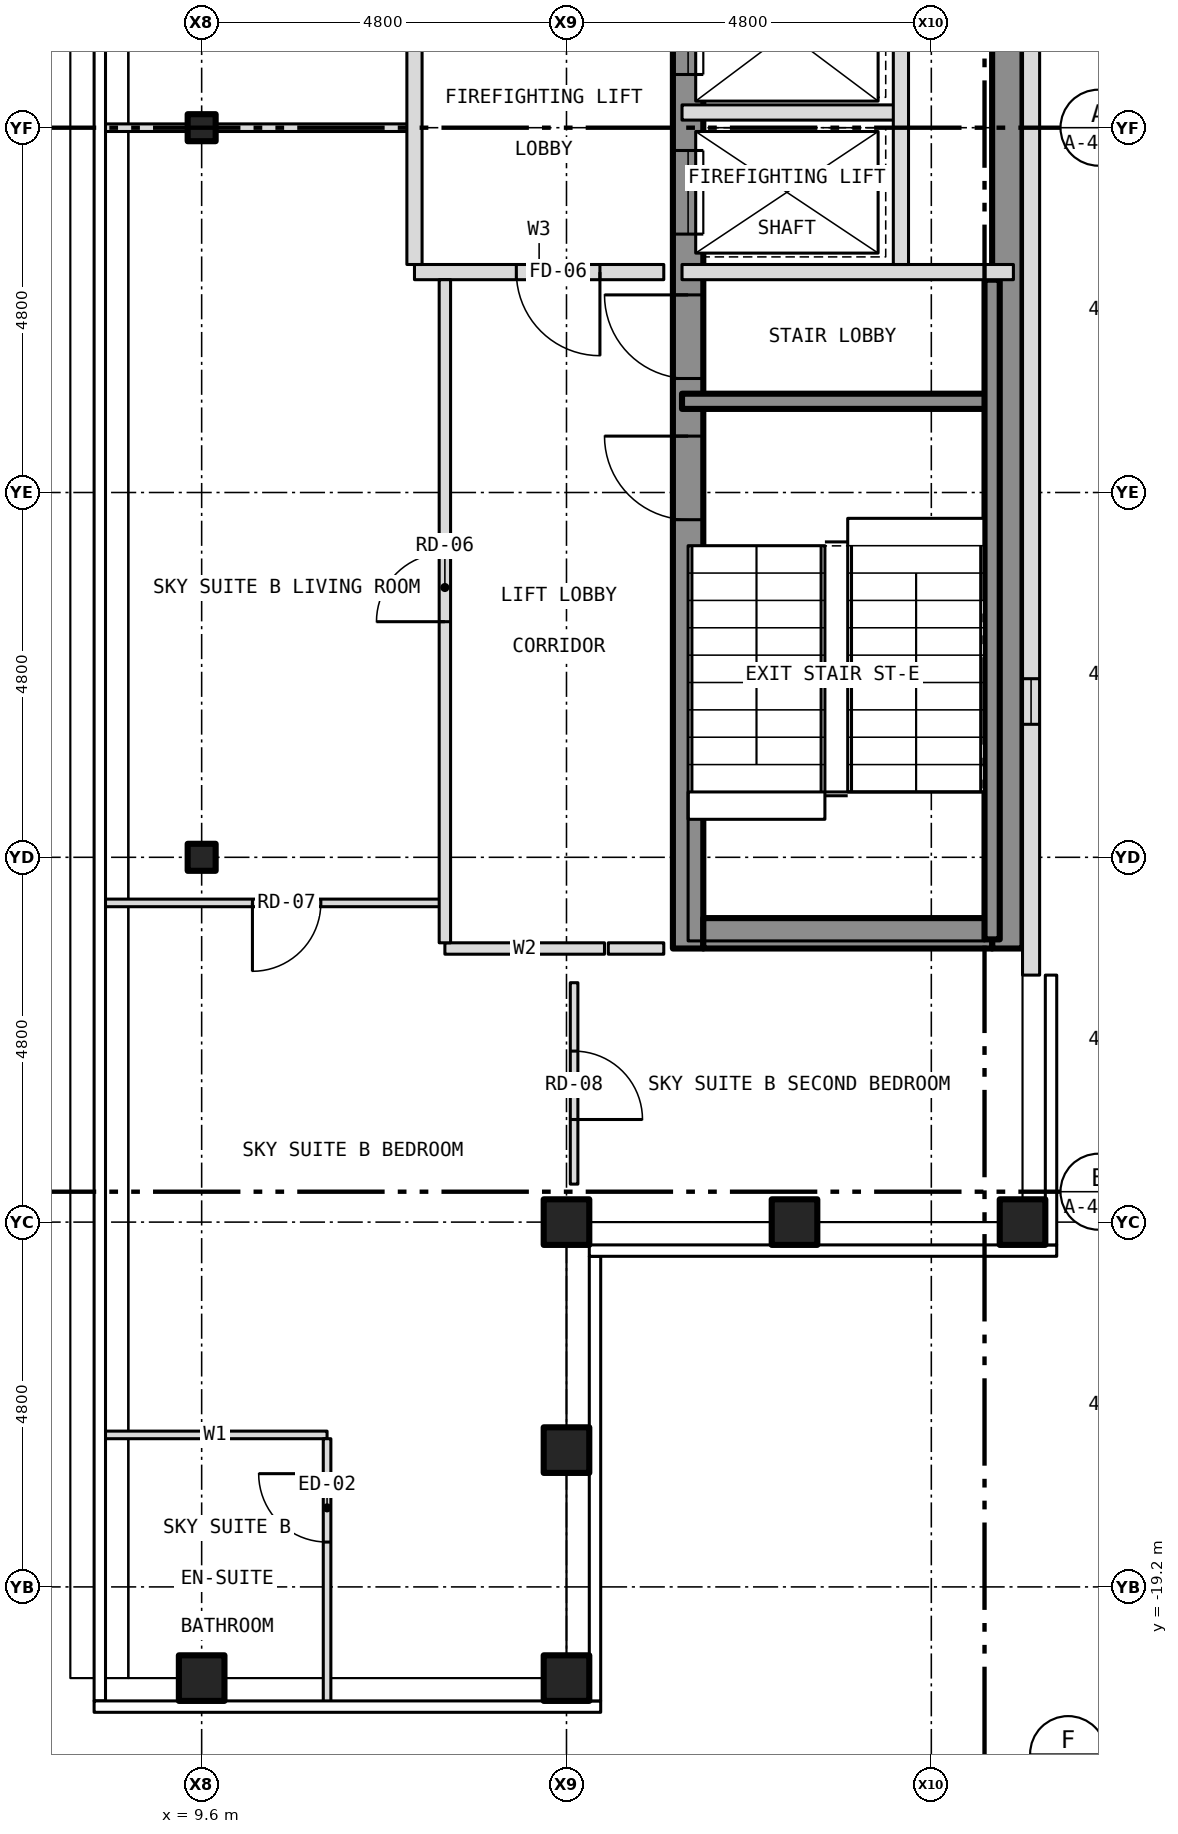
"""IFC4 building model, lengths in metres.
Left out: names, types, materials, properties, quantities, classifications, styles, units other than length and angle.
Written with IfcOpenShell. Run it as: python <this file> out.ifc"""

import sys

from ifc_helpers import new_model, si_unit, direction, frame, frame_2d, origin, origin_2d, place, context, subcontext, project, spatial, rectangle, hollow_rectangle, i_section, extrude, element, fill, save


model = new_model("IFC4")
c1 = context("Model", 3, precision=1e-05, world=origin(), true_north=direction((0.0, 1.0)))
c2 = subcontext(c1, "Body", "Model", "MODEL_VIEW")
j1 = project(units=[si_unit("LENGTHUNIT", "METRE"), si_unit("PLANEANGLEUNIT", "RADIAN")], contexts=[c1])
p1 = place(None, origin())
s1 = spatial("IfcSite", under=j1, at=p1, CompositionType="ELEMENT")
p2 = place(p1, origin())
s2 = spatial("IfcBuilding", under=s1, at=p2, CompositionType="ELEMENT")
p3 = place(p2, frame((0.0, 0.0, 272.5)))
s3 = spatial("IfcBuildingStorey", under=s2, at=p3, CompositionType="ELEMENT", Elevation=272.5)
for number, where, z_axis, x_axis in (
    (1, (9.6, -20.4, -0.15), (0.0, 0.0, 1.0), (1.0, 0.0, 0.0)),
    (2, (14.4, -20.4, -0.15), (0.0, 0.0, 1.0), (1.0, 0.0, 0.0)),
    (3, (20.4, -14.4, -0.15), (0.0, 0.0, 1.0), (1.0, 0.0, 0.0)),
    (4, (14.4, -14.4, -0.15), (0.0, 0.0, 1.0), (1.0, 0.0, 0.0)),
    (5, (14.4, -17.4, -0.15), (0.0, 0.0, 1.0), (1.0, 0.0, 0.0)),
    (6, (17.4, -14.4, -0.15), (0.0, 0.0, 1.0), (1.0, 0.0, 0.0)),
):
    element("IfcColumn", number, at=place(p3, frame(where, z_axis=z_axis, x_axis=x_axis)), inside=s3, PredefinedType="COLUMN", context=c2, shape_type="SweptSolid", body=[
        extrude(hollow_rectangle(XDim=0.6, YDim=0.6, WallThickness=0.03, at=origin_2d()), origin(), (0.0, 0.0, 1.0), 3.5),
    ])
for number, where, z_axis, x_axis in (
    (7, (9.6, -9.6, -0.15), (0.0, 0.0, 1.0), (1.0, 0.0, 0.0)),
    (8, (9.6, 0.0, -0.15), (0.0, 0.0, 1.0), (1.0, 0.0, 0.0)),
):
    element("IfcColumn", number, at=place(p3, frame(where, z_axis=z_axis, x_axis=x_axis)), inside=s3, PredefinedType="COLUMN", context=c2, shape_type="SweptSolid", body=[
        extrude(i_section(OverallWidth=0.368, OverallDepth=0.356, WebThickness=0.011, FlangeThickness=0.018, at=origin_2d()), origin(), (0.0, 0.0, 1.0), 3.5),
    ])
p4 = place(p3, frame((16.0, -10.8, 0.0), z_axis=(0.0, 0.0, 1.0), x_axis=(0.0, 1.0, 0.0)))
e9 = element("IfcWall", 9, at=p4, inside=s3, PredefinedType="SHEAR", context=c2, shape_type="SweptSolid", body=[
    extrude(rectangle(XDim=21.6, YDim=0.4, at=frame_2d((10.8, 0.0))), origin(), (0.0, 0.0, 1.0), 3.25),
])
p5 = place(p4, frame((9.4, 0.0, 0.0)))
e10 = element("IfcOpeningElement", 10, at=p5, cuts=e9, PredefinedType="OPENING", context=c2, shape_type="SweptSolid", body=[
    extrude(rectangle(XDim=1.1, YDim=2.1, at=frame_2d((0.55, 1.05))), frame((0.0, 0.212, 0.0), z_axis=(0.0, -1.0, 0.0), x_axis=(1.0, 0.0, 0.0)), (0.0, 0.0, 1.0), 0.424),
])
p6 = place(p4, frame((11.5, 0.0, 0.0)))
e11 = element("IfcOpeningElement", 11, at=p6, cuts=e9, PredefinedType="OPENING", context=c2, shape_type="SweptSolid", body=[
    extrude(rectangle(XDim=1.1, YDim=2.1, at=frame_2d((0.55, 1.05))), frame((0.0, 0.212, 0.0), z_axis=(0.0, -1.0, 0.0), x_axis=(1.0, 0.0, 0.0)), (0.0, 0.0, 1.0), 0.424),
])
p7 = place(p4, frame((13.6, 0.0, 0.0)))
e12 = element("IfcOpeningElement", 12, at=p7, cuts=e9, PredefinedType="OPENING", context=c2, shape_type="SweptSolid", body=[
    extrude(rectangle(XDim=1.1, YDim=2.1, at=frame_2d((0.55, 1.05))), frame((0.0, 0.212, 0.0), z_axis=(0.0, -1.0, 0.0), x_axis=(1.0, 0.0, 0.0)), (0.0, 0.0, 1.0), 0.424),
])
p8 = place(p4, frame((15.7, 0.0, 0.0)))
e13 = element("IfcOpeningElement", 13, at=p8, cuts=e9, PredefinedType="OPENING", context=c2, shape_type="SweptSolid", body=[
    extrude(rectangle(XDim=1.1, YDim=2.1, at=frame_2d((0.55, 1.05))), frame((0.0, 0.212, 0.0), z_axis=(0.0, -1.0, 0.0), x_axis=(1.0, 0.0, 0.0)), (0.0, 0.0, 1.0), 0.424),
])
p9 = place(p4, frame((17.8, 0.0, 0.0)))
e14 = element("IfcOpeningElement", 14, at=p9, cuts=e9, PredefinedType="OPENING", context=c2, shape_type="SweptSolid", body=[
    extrude(rectangle(XDim=1.1, YDim=2.1, at=frame_2d((0.55, 1.05))), frame((0.0, 0.212, 0.0), z_axis=(0.0, -1.0, 0.0), x_axis=(1.0, 0.0, 0.0)), (0.0, 0.0, 1.0), 0.424),
])
p10 = place(p4, frame((5.642, 0.0, 0.0)))
e15 = element("IfcOpeningElement", 15, at=p10, cuts=e9, PredefinedType="OPENING", context=c2, shape_type="SweptSolid", body=[
    extrude(rectangle(XDim=1.1, YDim=2.1, at=frame_2d((0.55, 1.05))), frame((0.0, 0.212, 0.0), z_axis=(0.0, -1.0, 0.0), x_axis=(1.0, 0.0, 0.0)), (0.0, 0.0, 1.0), 0.424),
])
p11 = place(p4, frame((7.5, 0.0, 0.0)))
e16 = element("IfcOpeningElement", 16, at=p11, cuts=e9, PredefinedType="OPENING", context=c2, shape_type="SweptSolid", body=[
    extrude(rectangle(XDim=1.1, YDim=2.1, at=frame_2d((0.55, 1.05))), frame((0.0, 0.212, 0.0), z_axis=(0.0, -1.0, 0.0), x_axis=(1.0, 0.0, 0.0)), (0.0, 0.0, 1.0), 0.424),
])
p12 = place(p4, frame((20.0, 0.0, 0.0)))
e17 = element("IfcOpeningElement", 17, at=p12, cuts=e9, PredefinedType="OPENING", context=c2, shape_type="SweptSolid", body=[
    extrude(rectangle(XDim=0.9, YDim=2.1, at=frame_2d((0.45, 1.05))), frame((0.0, 0.212, 0.0), z_axis=(0.0, -1.0, 0.0), x_axis=(1.0, 0.0, 0.0)), (0.0, 0.0, 1.0), 0.424),
])
p13 = place(p3, frame((20.2, -10.8, 0.0), z_axis=(0.0, 0.0, 1.0), x_axis=(0.0, 1.0, 0.0)))
e18 = element("IfcWall", 18, at=p13, inside=s3, PredefinedType="SHEAR", context=c2, shape_type="SweptSolid", body=[
    extrude(rectangle(XDim=21.6, YDim=0.4, at=frame_2d((10.8, 0.0))), origin(), (0.0, 0.0, 1.0), 3.25),
])
p14 = place(p3, frame((16.2, -10.6, 0.0), z_axis=(0.0, 0.0, 1.0), x_axis=(1.0, 0.0, 0.0)))
e19 = element("IfcWall", 19, at=p14, inside=s3, PredefinedType="SHEAR", context=c2, shape_type="SweptSolid", body=[
    extrude(rectangle(XDim=3.8, YDim=0.4, at=frame_2d((1.9, 0.0))), origin(), (0.0, 0.0, 1.0), 3.25),
])
p15 = place(p3, frame((20.512, -11.15, 0.0), z_axis=(0.0, 0.0, 1.0), x_axis=(0.0, 1.0, 0.0)))
e20 = element("IfcWall", 20, at=p15, inside=s3, PredefinedType="SOLIDWALL", context=c2, shape_type="SweptSolid", body=[
    extrude(rectangle(XDim=22.3, YDim=0.225, at=frame_2d((11.15, 0.0))), origin(), (0.0, 0.0, 1.0), 3.5),
])
p16 = place(p15, frame((3.3, 0.0, 1.0)))
e21 = element("IfcOpeningElement", 21, at=p16, cuts=e20, PredefinedType="OPENING", context=c2, shape_type="SweptSolid", body=[
    extrude(rectangle(XDim=0.6, YDim=1.5, at=frame_2d((0.3, 0.75))), frame((0.0, 0.125, 0.0), z_axis=(0.0, -1.0, 0.0), x_axis=(1.0, 0.0, 0.0)), (0.0, 0.0, 1.0), 0.249),
])
p17 = place(p3, frame((8.305, -17.2, 0.0), z_axis=(0.0, 0.0, 1.0), x_axis=(1.0, 0.0, 0.0)))
e22 = element("IfcWall", 22, at=p17, inside=s3, PredefinedType="PARTITIONING", context=c2, shape_type="SweptSolid", body=[
    extrude(rectangle(XDim=2.945, YDim=0.1, at=frame_2d((1.473, 0.0))), origin(), (0.0, 0.0, 1.0), 3.35),
])
p18 = place(p3, frame((12.8, -10.8, 0.0), z_axis=(0.0, 0.0, 1.0), x_axis=(1.0, 0.0, 0.0)))
e23 = element("IfcWall", 23, at=p18, inside=s3, PredefinedType="PARTITIONING", context=c2, shape_type="SweptSolid", body=[
    extrude(rectangle(XDim=2.1, YDim=0.15, at=frame_2d((1.05, 0.0))), origin(), (0.0, 0.0, 1.0), 3.35),
])
p19 = place(p3, frame((14.95, -10.8, 0.0), z_axis=(0.0, 0.0, 1.0), x_axis=(1.0, 0.0, 0.0)))
e24 = element("IfcWall", 24, at=p19, inside=s3, PredefinedType="PARTITIONING", context=c2, shape_type="SweptSolid", body=[
    extrude(rectangle(XDim=0.73, YDim=0.15, at=frame_2d((0.365, 0.0))), origin(), (0.0, 0.0, 1.0), 3.35),
])
p20 = place(p3, frame((8.305, -10.2, 0.0), z_axis=(0.0, 0.0, 1.0), x_axis=(1.0, 0.0, 0.0)))
e25 = element("IfcWall", 25, at=p20, inside=s3, PredefinedType="PARTITIONING", context=c2, shape_type="SweptSolid", body=[
    extrude(rectangle(XDim=4.495, YDim=0.1, at=frame_2d((2.248, 0.0))), origin(), (0.0, 0.0, 1.0), 3.35),
])
p21 = place(p20, frame((1.963, 0.0, 0.0)))
e26 = element("IfcOpeningElement", 26, at=p21, cuts=e25, PredefinedType="OPENING", context=c2, shape_type="SweptSolid", body=[
    extrude(rectangle(XDim=0.9, YDim=2.1, at=frame_2d((0.45, 1.05))), frame((0.0, 0.062, 0.0), z_axis=(0.0, -1.0, 0.0), x_axis=(1.0, 0.0, 0.0)), (0.0, 0.0, 1.0), 0.124),
])
p22 = place(p3, frame((15.92, -3.6, 0.0), z_axis=(0.0, 0.0, 1.0), x_axis=(1.0, 0.0, 0.0)))
e27 = element("IfcWall", 27, at=p22, inside=s3, PredefinedType="SHEAR", context=c2, shape_type="SweptSolid", body=[
    extrude(rectangle(XDim=4.08, YDim=0.2, at=frame_2d((2.04, 0.0))), origin(), (0.0, 0.0, 1.0), 3.25),
])
p23 = place(p3, frame((12.4, -1.9, 0.0), z_axis=(0.0, 0.0, 1.0), x_axis=(1.0, 0.0, 0.0)))
e28 = element("IfcWall", 28, at=p23, inside=s3, PredefinedType="PARTITIONING", context=c2, shape_type="SweptSolid", body=[
    extrude(rectangle(XDim=3.28, YDim=0.2, at=frame_2d((1.64, 0.0))), origin(), (0.0, 0.0, 1.0), 3.35),
])
p24 = place(p23, frame((1.34, 0.0, 0.0)))
e29 = element("IfcOpeningElement", 29, at=p24, cuts=e28, PredefinedType="OPENING", context=c2, shape_type="SweptSolid", body=[
    extrude(rectangle(XDim=1.1, YDim=2.1, at=frame_2d((0.55, 1.05))), frame((0.0, 0.112, 0.0), z_axis=(0.0, -1.0, 0.0), x_axis=(1.0, 0.0, 0.0)), (0.0, 0.0, 1.0), 0.224),
])
p25 = place(p3, frame((15.92, -1.9, 0.0), z_axis=(0.0, 0.0, 1.0), x_axis=(1.0, 0.0, 0.0)))
e30 = element("IfcWall", 30, at=p25, inside=s3, PredefinedType="PARTITIONING", context=c2, shape_type="SweptSolid", body=[
    extrude(rectangle(XDim=4.36, YDim=0.2, at=frame_2d((2.18, 0.0))), origin(), (0.0, 0.0, 1.0), 3.25),
])
p26 = place(p3, frame((8.305, 0.0, 0.0), z_axis=(0.0, 0.0, 1.0), x_axis=(1.0, 0.0, 0.0)))
e31 = element("IfcWall", 31, at=p26, inside=s3, PredefinedType="PARTITIONING", context=c2, shape_type="SweptSolid", body=[
    extrude(rectangle(XDim=1.479, YDim=0.1, at=frame_2d((0.74, 0.0))), origin(), (0.0, 0.0, 1.0), 3.35),
])
p27 = place(p3, frame((9.784, 0.0, 0.0), z_axis=(0.0, 0.0, 1.0), x_axis=(1.0, 0.0, 0.0)))
e32 = element("IfcWall", 32, at=p27, inside=s3, PredefinedType="PARTITIONING", context=c2, shape_type="SweptSolid", body=[
    extrude(rectangle(XDim=2.616, YDim=0.1, at=frame_2d((1.308, 0.0))), origin(), (0.0, 0.0, 1.0), 2.728),
])
p28 = place(p3, frame((15.92, 0.2, 0.0), z_axis=(0.0, 0.0, 1.0), x_axis=(1.0, 0.0, 0.0)))
e33 = element("IfcWall", 33, at=p28, inside=s3, PredefinedType="PARTITIONING", context=c2, shape_type="SweptSolid", body=[
    extrude(rectangle(XDim=2.88, YDim=0.2, at=frame_2d((1.44, 0.0))), origin(), (0.0, 0.0, 1.0), 3.25),
])
p29 = place(p3, frame((11.25, -20.73, 0.0), z_axis=(0.0, 0.0, 1.0), x_axis=(0.0, 1.0, 0.0)))
e34 = element("IfcWall", 34, at=p29, inside=s3, PredefinedType="PARTITIONING", context=c2, shape_type="SweptSolid", body=[
    extrude(rectangle(XDim=3.48, YDim=0.1, at=frame_2d((1.74, 0.0))), origin(), (0.0, 0.0, 1.0), 3.35),
])
p30 = place(p29, frame((2.12, 0.0, 0.0)))
e35 = element("IfcOpeningElement", 35, at=p30, cuts=e34, PredefinedType="OPENING", context=c2, shape_type="SweptSolid", body=[
    extrude(rectangle(XDim=0.9, YDim=2.1, at=frame_2d((0.45, 1.05))), frame((0.0, 0.062, 0.0), z_axis=(0.0, -1.0, 0.0), x_axis=(1.0, 0.0, 0.0)), (0.0, 0.0, 1.0), 0.124),
])
p31 = place(p3, frame((12.4, -1.8, 0.0), z_axis=(0.0, 0.0, 1.0), x_axis=(0.0, 1.0, 0.0)))
e36 = element("IfcWall", 36, at=p31, inside=s3, PredefinedType="PARTITIONING", context=c2, shape_type="SweptSolid", body=[
    extrude(rectangle(XDim=4.0, YDim=0.2, at=frame_2d((2.0, 0.0))), origin(), (0.0, 0.0, 1.0), 3.35),
])
p32 = place(p3, frame((12.8, -10.725, 0.0), z_axis=(0.0, 0.0, 1.0), x_axis=(0.0, 1.0, 0.0)))
e37 = element("IfcWall", 37, at=p32, inside=s3, PredefinedType="PARTITIONING", context=c2, shape_type="SweptSolid", body=[
    extrude(rectangle(XDim=8.725, YDim=0.15, at=frame_2d((4.363, 0.0))), origin(), (0.0, 0.0, 1.0), 3.35),
])
p33 = place(p32, frame((4.225, 0.0, 0.0)))
e38 = element("IfcOpeningElement", 38, at=p33, cuts=e37, PredefinedType="OPENING", context=c2, shape_type="SweptSolid", body=[
    extrude(rectangle(XDim=0.9, YDim=2.1, at=frame_2d((0.45, 1.05))), frame((0.0, 0.087, 0.0), z_axis=(0.0, -1.0, 0.0), x_axis=(1.0, 0.0, 0.0)), (0.0, 0.0, 1.0), 0.174),
])
p34 = place(p3, frame((14.5, -13.9, 0.0), z_axis=(0.0, 0.0, 1.0), x_axis=(0.0, 1.0, 0.0)))
e39 = element("IfcWall", 39, at=p34, inside=s3, PredefinedType="PARTITIONING", context=c2, shape_type="SweptSolid", body=[
    extrude(rectangle(XDim=2.65, YDim=0.1, at=frame_2d((1.325, 0.0))), origin(), (0.0, 0.0, 1.0), 2.817),
])
p35 = place(p34, frame((0.85, 0.0, 0.0)))
e40 = element("IfcOpeningElement", 40, at=p35, cuts=e39, PredefinedType="OPENING", context=c2, shape_type="SweptSolid", body=[
    extrude(rectangle(XDim=0.9, YDim=2.1, at=frame_2d((0.45, 1.05))), frame((0.0, 0.062, 0.0), z_axis=(0.0, -1.0, 0.0), x_axis=(1.0, 0.0, 0.0)), (0.0, 0.0, 1.0), 0.124),
])
p36 = place(p3, frame((18.8, -1.8, 0.0), z_axis=(0.0, 0.0, 1.0), x_axis=(0.0, 1.0, 0.0)))
e41 = element("IfcWall", 41, at=p36, inside=s3, PredefinedType="PARTITIONING", context=c2, shape_type="SweptSolid", body=[
    extrude(rectangle(XDim=8.2, YDim=0.2, at=frame_2d((4.1, 0.0))), origin(), (0.0, 0.0, 1.0), 3.25),
])
p37 = place(p3, frame((20.0, -10.68, 0.0), z_axis=(0.0, 0.0, 1.0), x_axis=(0.0, 1.0, 0.0)))
e42 = element("IfcWall", 42, at=p37, inside=s3, PredefinedType="SHEAR", context=c2, shape_type="SweptSolid", body=[
    extrude(rectangle(XDim=8.68, YDim=0.2, at=frame_2d((4.34, 0.0))), origin(), (0.0, 0.0, 1.0), 3.25),
])
p38 = place(p16, origin())
e43 = element("IfcWindow", 43, at=p38, inside=s3, PartitioningType="SINGLE_PANEL", PredefinedType="WINDOW", context=c2, shape_type="SweptSolid", body=[
    extrude(rectangle(XDim=0.6, YDim=1.5, at=frame_2d((0.3, 0.75))), frame((0.0, -0.022, 0.0), z_axis=(0.0, -1.0, 0.0), x_axis=(1.0, 0.0, 0.0)), (0.0, 0.0, 1.0), 0.06),
])
fill(e21, e43)
p39 = place(p5, origin())
e44 = element("IfcDoor", 44, at=p39, inside=s3, OperationType="SLIDING_TO_LEFT", PredefinedType="DOOR", context=c2, shape_type="SweptSolid", body=[
    extrude(rectangle(XDim=1.1, YDim=2.1, at=frame_2d((0.55, 1.05))), frame((0.0, 0.025, 0.0), z_axis=(0.0, -1.0, 0.0), x_axis=(1.0, 0.0, 0.0)), (0.0, 0.0, 1.0), 0.05),
])
fill(e10, e44)
p40 = place(p6, origin())
e45 = element("IfcDoor", 45, at=p40, inside=s3, OperationType="SLIDING_TO_LEFT", PredefinedType="DOOR", context=c2, shape_type="SweptSolid", body=[
    extrude(rectangle(XDim=1.1, YDim=2.1, at=frame_2d((0.55, 1.05))), frame((0.0, 0.025, 0.0), z_axis=(0.0, -1.0, 0.0), x_axis=(1.0, 0.0, 0.0)), (0.0, 0.0, 1.0), 0.05),
])
fill(e11, e45)
p41 = place(p10, origin())
e46 = element("IfcDoor", 46, at=p41, inside=s3, OperationType="SINGLE_SWING_RIGHT", PredefinedType="DOOR", context=c2, shape_type="SweptSolid", body=[
    extrude(rectangle(XDim=1.1, YDim=2.1, at=frame_2d((0.55, 1.05))), frame((0.0, 0.025, 0.0), z_axis=(0.0, -1.0, 0.0), x_axis=(1.0, 0.0, 0.0)), (0.0, 0.0, 1.0), 0.05),
])
fill(e15, e46)
p42 = place(p11, origin())
e47 = element("IfcDoor", 47, at=p42, inside=s3, OperationType="SINGLE_SWING_RIGHT", PredefinedType="DOOR", context=c2, shape_type="SweptSolid", body=[
    extrude(rectangle(XDim=1.1, YDim=2.1, at=frame_2d((0.55, 1.05))), frame((0.0, 0.025, 0.0), z_axis=(0.0, -1.0, 0.0), x_axis=(1.0, 0.0, 0.0)), (0.0, 0.0, 1.0), 0.05),
])
fill(e16, e47)
p43 = place(p24, origin())
e48 = element("IfcDoor", 48, at=p43, inside=s3, OperationType="SINGLE_SWING_RIGHT", PredefinedType="DOOR", context=c2, shape_type="SweptSolid", body=[
    extrude(rectangle(XDim=1.1, YDim=2.1, at=frame_2d((0.55, 1.05))), frame((0.0, 0.025, 0.0), z_axis=(0.0, -1.0, 0.0), x_axis=(1.0, 0.0, 0.0)), (0.0, 0.0, 1.0), 0.05),
])
fill(e29, e48)
p44 = place(p33, origin())
e49 = element("IfcDoor", 49, at=p44, inside=s3, OperationType="SINGLE_SWING_LEFT", PredefinedType="DOOR", context=c2, shape_type="SweptSolid", body=[
    extrude(rectangle(XDim=0.9, YDim=2.1, at=frame_2d((0.45, 1.05))), frame((0.0, 0.025, 0.0), z_axis=(0.0, -1.0, 0.0), x_axis=(1.0, 0.0, 0.0)), (0.0, 0.0, 1.0), 0.05),
])
fill(e38, e49)
p45 = place(p21, origin())
e50 = element("IfcDoor", 50, at=p45, inside=s3, OperationType="SINGLE_SWING_LEFT", PredefinedType="DOOR", context=c2, shape_type="SweptSolid", body=[
    extrude(rectangle(XDim=0.9, YDim=2.1, at=frame_2d((0.45, 1.05))), frame((0.0, 0.025, 0.0), z_axis=(0.0, -1.0, 0.0), x_axis=(1.0, 0.0, 0.0)), (0.0, 0.0, 1.0), 0.05),
])
fill(e26, e50)
p46 = place(p30, origin())
e51 = element("IfcDoor", 51, at=p46, inside=s3, OperationType="SINGLE_SWING_RIGHT", PredefinedType="DOOR", context=c2, shape_type="SweptSolid", body=[
    extrude(rectangle(XDim=0.9, YDim=2.1, at=frame_2d((0.45, 1.05))), frame((0.0, 0.025, 0.0), z_axis=(0.0, -1.0, 0.0), x_axis=(1.0, 0.0, 0.0)), (0.0, 0.0, 1.0), 0.05),
])
fill(e35, e51)
p47 = place(p35, origin())
e52 = element("IfcDoor", 52, at=p47, inside=s3, OperationType="SINGLE_SWING_LEFT", PredefinedType="DOOR", context=c2, shape_type="SweptSolid", body=[
    extrude(rectangle(XDim=0.9, YDim=2.1, at=frame_2d((0.45, 1.05))), frame((0.0, 0.025, 0.0), z_axis=(0.0, -1.0, 0.0), x_axis=(1.0, 0.0, 0.0)), (0.0, 0.0, 1.0), 0.05),
])
fill(e40, e52)
save(model, sys.argv[1])
